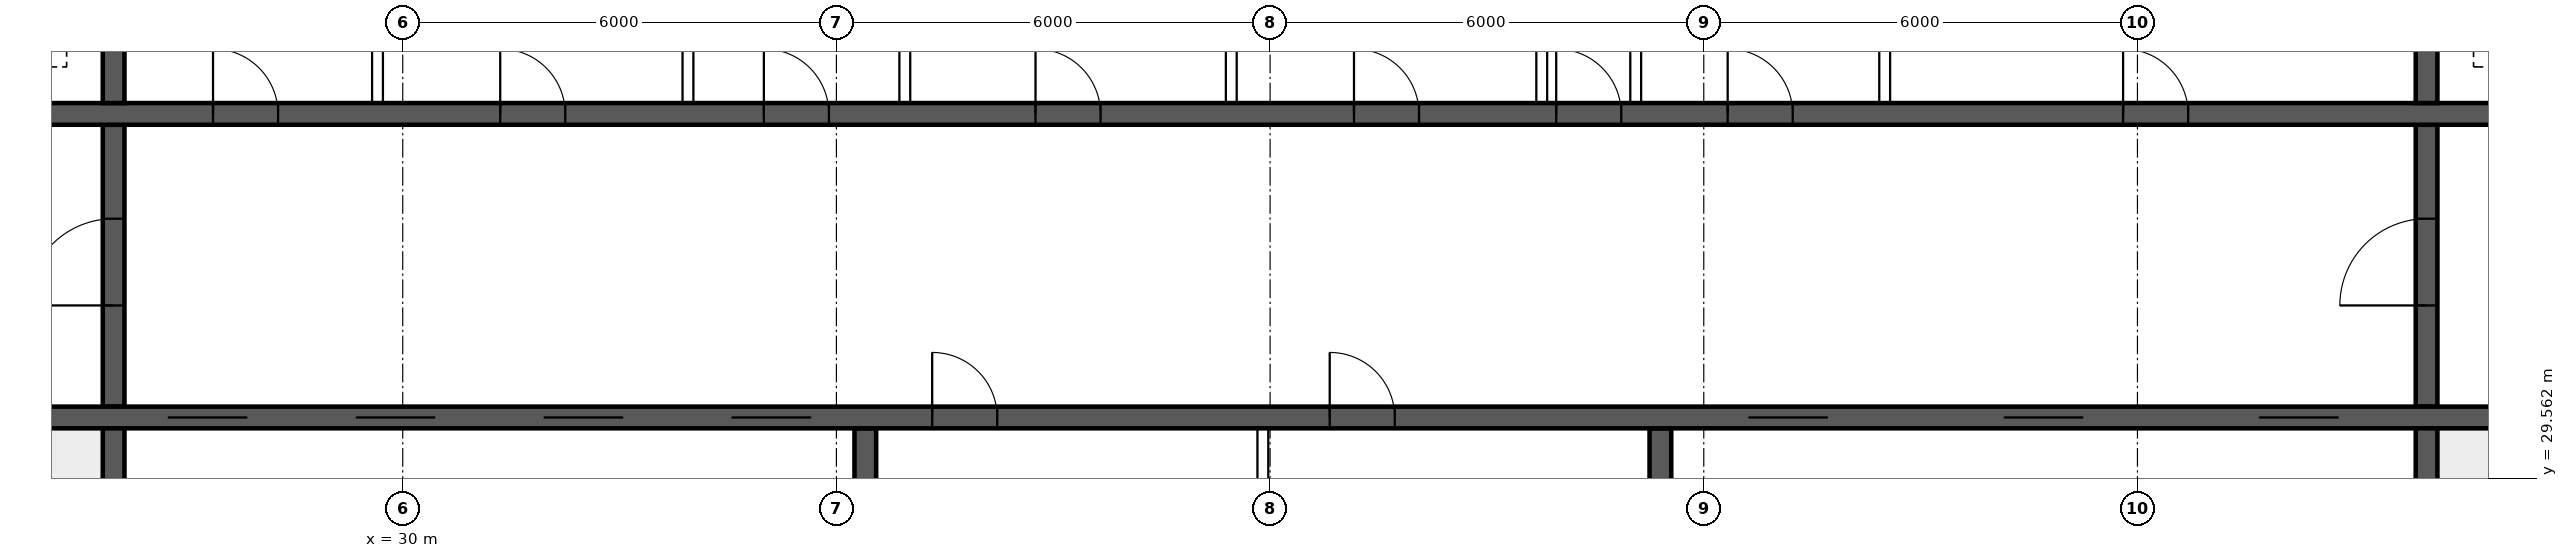
"""IFC4 building model, lengths in metres.
Left out: names, types, materials, properties, quantities, classifications, styles, units other than length and angle.
Written with IfcOpenShell. Run it as: python <this file> out.ifc"""

import sys

from ifc_helpers import new_model, si_unit, direction, frame, frame_2d, origin, place, context, subcontext, project, spatial, rectangle, extrude, element, fill, save


model = new_model("IFC4")
c1 = context("Model", 3, precision=1e-05, world=origin(), true_north=direction((0.0, 1.0)))
c2 = subcontext(c1, "Body", "Model", "MODEL_VIEW")
j1 = project(units=[si_unit("LENGTHUNIT", "METRE"), si_unit("PLANEANGLEUNIT", "RADIAN")], contexts=[c1])
p1 = place(None, origin())
s1 = spatial("IfcSite", under=j1, at=p1, CompositionType="ELEMENT")
p2 = place(p1, origin())
s2 = spatial("IfcBuilding", under=s1, at=p2, CompositionType="ELEMENT")
p3 = place(p2, frame((0.0, 0.0, 254.05)))
s3 = spatial("IfcBuildingStorey", under=s2, at=p3, CompositionType="ELEMENT", Elevation=254.05)
p4 = place(p3, frame((18.35, 30.4, 0.0), z_axis=(0.0, 0.0, 1.0), x_axis=(1.0, 0.0, 0.0)))
e1 = element("IfcWall", 1, at=p4, inside=s3, PredefinedType="SHEAR", context=c2, shape_type="SweptSolid", body=[
    extrude(rectangle(XDim=47.3, YDim=0.3, at=frame_2d((23.65, 0.0))), origin(), (0.0, 0.0, 1.0), 3.75),
])
p5 = place(p4, frame((0.4, 0.0, 0.0)))
e2 = element("IfcOpeningElement", 2, at=p5, cuts=e1, PredefinedType="OPENING", context=c2, shape_type="SweptSolid", body=[
    extrude(rectangle(XDim=1.0, YDim=2.1, at=frame_2d((0.5, 1.05))), frame((0.0, 0.16, 0.0), z_axis=(0.0, -1.0, 0.0), x_axis=(1.0, 0.0, 0.0)), (0.0, 0.0, 1.0), 0.32),
])
p6 = place(p4, frame((45.9, 0.0, 0.0)))
e3 = element("IfcOpeningElement", 3, at=p6, cuts=e1, PredefinedType="OPENING", context=c2, shape_type="SweptSolid", body=[
    extrude(rectangle(XDim=1.0, YDim=2.1, at=frame_2d((0.5, 1.05))), frame((0.0, 0.16, 0.0), z_axis=(0.0, -1.0, 0.0), x_axis=(1.0, 0.0, 0.0)), (0.0, 0.0, 1.0), 0.32),
])
p7 = place(p4, frame((8.4, 0.0, 0.0)))
e4 = element("IfcOpeningElement", 4, at=p7, cuts=e1, PredefinedType="OPENING", context=c2, shape_type="SweptSolid", body=[
    extrude(rectangle(XDim=1.1, YDim=2.1, at=frame_2d((0.55, 1.05))), frame((0.0, 0.16, 0.0), z_axis=(0.0, -1.0, 0.0), x_axis=(1.0, 0.0, 0.0)), (0.0, 0.0, 1.0), 0.32),
])
p8 = place(p4, frame((11.0, 0.0, 0.0)))
e5 = element("IfcOpeningElement", 5, at=p8, cuts=e1, PredefinedType="OPENING", context=c2, shape_type="SweptSolid", body=[
    extrude(rectangle(XDim=1.1, YDim=2.1, at=frame_2d((0.55, 1.05))), frame((0.0, 0.16, 0.0), z_axis=(0.0, -1.0, 0.0), x_axis=(1.0, 0.0, 0.0)), (0.0, 0.0, 1.0), 0.32),
])
p9 = place(p4, frame((13.6, 0.0, 0.0)))
e6 = element("IfcOpeningElement", 6, at=p9, cuts=e1, PredefinedType="OPENING", context=c2, shape_type="SweptSolid", body=[
    extrude(rectangle(XDim=1.1, YDim=2.1, at=frame_2d((0.55, 1.05))), frame((0.0, 0.16, 0.0), z_axis=(0.0, -1.0, 0.0), x_axis=(1.0, 0.0, 0.0)), (0.0, 0.0, 1.0), 0.32),
])
p10 = place(p4, frame((16.2, 0.0, 0.0)))
e7 = element("IfcOpeningElement", 7, at=p10, cuts=e1, PredefinedType="OPENING", context=c2, shape_type="SweptSolid", body=[
    extrude(rectangle(XDim=1.1, YDim=2.1, at=frame_2d((0.55, 1.05))), frame((0.0, 0.16, 0.0), z_axis=(0.0, -1.0, 0.0), x_axis=(1.0, 0.0, 0.0)), (0.0, 0.0, 1.0), 0.32),
])
p11 = place(p4, frame((18.975, 0.0, 0.0)))
e8 = element("IfcOpeningElement", 8, at=p11, cuts=e1, PredefinedType="OPENING", context=c2, shape_type="SweptSolid", body=[
    extrude(rectangle(XDim=0.9, YDim=2.1, at=frame_2d((0.45, 1.05))), frame((0.0, 0.16, 0.0), z_axis=(0.0, -1.0, 0.0), x_axis=(1.0, 0.0, 0.0)), (0.0, 0.0, 1.0), 0.32),
])
p12 = place(p4, frame((24.475, 0.0, 0.0)))
e9 = element("IfcOpeningElement", 9, at=p12, cuts=e1, PredefinedType="OPENING", context=c2, shape_type="SweptSolid", body=[
    extrude(rectangle(XDim=0.9, YDim=2.1, at=frame_2d((0.45, 1.05))), frame((0.0, 0.16, 0.0), z_axis=(0.0, -1.0, 0.0), x_axis=(1.0, 0.0, 0.0)), (0.0, 0.0, 1.0), 0.32),
])
p13 = place(p4, frame((30.267, 0.0, 0.0)))
e10 = element("IfcOpeningElement", 10, at=p13, cuts=e1, PredefinedType="OPENING", context=c2, shape_type="SweptSolid", body=[
    extrude(rectangle(XDim=1.1, YDim=2.1, at=frame_2d((0.55, 1.05))), frame((0.0, 0.16, 0.0), z_axis=(0.0, -1.0, 0.0), x_axis=(1.0, 0.0, 0.0)), (0.0, 0.0, 1.0), 0.32),
])
p14 = place(p4, frame((33.8, 0.0, 0.0)))
e11 = element("IfcOpeningElement", 11, at=p14, cuts=e1, PredefinedType="OPENING", context=c2, shape_type="SweptSolid", body=[
    extrude(rectangle(XDim=1.1, YDim=2.1, at=frame_2d((0.55, 1.05))), frame((0.0, 0.16, 0.0), z_axis=(0.0, -1.0, 0.0), x_axis=(1.0, 0.0, 0.0)), (0.0, 0.0, 1.0), 0.32),
])
p15 = place(p4, frame((37.333, 0.0, 0.0)))
e12 = element("IfcOpeningElement", 12, at=p15, cuts=e1, PredefinedType="OPENING", context=c2, shape_type="SweptSolid", body=[
    extrude(rectangle(XDim=1.1, YDim=2.1, at=frame_2d((0.55, 1.05))), frame((0.0, 0.16, 0.0), z_axis=(0.0, -1.0, 0.0), x_axis=(1.0, 0.0, 0.0)), (0.0, 0.0, 1.0), 0.32),
])
p16 = place(p3, frame((18.35, 34.6, 0.0), z_axis=(0.0, 0.0, 1.0), x_axis=(1.0, 0.0, 0.0)))
e13 = element("IfcWall", 13, at=p16, inside=s3, PredefinedType="SHEAR", context=c2, shape_type="SweptSolid", body=[
    extrude(rectangle(XDim=47.3, YDim=0.3, at=frame_2d((23.65, 0.0))), origin(), (0.0, 0.0, 1.0), 3.75),
])
p17 = place(p16, frame((0.9, 0.0, 0.0)))
e14 = element("IfcOpeningElement", 14, at=p17, cuts=e13, PredefinedType="OPENING", context=c2, shape_type="SweptSolid", body=[
    extrude(rectangle(XDim=1.1, YDim=2.1, at=frame_2d((0.55, 1.05))), frame((0.0, 0.16, 0.0), z_axis=(0.0, -1.0, 0.0), x_axis=(1.0, 0.0, 0.0)), (0.0, 0.0, 1.0), 0.32),
])
p18 = place(p16, frame((45.3, 0.0, 0.0)))
e15 = element("IfcOpeningElement", 15, at=p18, cuts=e13, PredefinedType="OPENING", context=c2, shape_type="SweptSolid", body=[
    extrude(rectangle(XDim=1.1, YDim=2.1, at=frame_2d((0.55, 1.05))), frame((0.0, 0.16, 0.0), z_axis=(0.0, -1.0, 0.0), x_axis=(1.0, 0.0, 0.0)), (0.0, 0.0, 1.0), 0.32),
])
p19 = place(p16, frame((4.25, 0.0, 0.0)))
e16 = element("IfcOpeningElement", 16, at=p19, cuts=e13, PredefinedType="OPENING", context=c2, shape_type="SweptSolid", body=[
    extrude(rectangle(XDim=0.9, YDim=2.1, at=frame_2d((0.45, 1.05))), frame((0.0, 0.16, 0.0), z_axis=(0.0, -1.0, 0.0), x_axis=(1.0, 0.0, 0.0)), (0.0, 0.0, 1.0), 0.32),
])
p20 = place(p16, frame((42.15, 0.0, 0.0)))
e17 = element("IfcOpeningElement", 17, at=p20, cuts=e13, PredefinedType="OPENING", context=c2, shape_type="SweptSolid", body=[
    extrude(rectangle(XDim=0.9, YDim=2.1, at=frame_2d((0.45, 1.05))), frame((0.0, 0.16, 0.0), z_axis=(0.0, -1.0, 0.0), x_axis=(1.0, 0.0, 0.0)), (0.0, 0.0, 1.0), 0.32),
])
p21 = place(p16, frame((9.025, 0.0, 0.0)))
e18 = element("IfcOpeningElement", 18, at=p21, cuts=e13, PredefinedType="OPENING", context=c2, shape_type="SweptSolid", body=[
    extrude(rectangle(XDim=0.9, YDim=2.1, at=frame_2d((0.45, 1.05))), frame((0.0, 0.16, 0.0), z_axis=(0.0, -1.0, 0.0), x_axis=(1.0, 0.0, 0.0)), (0.0, 0.0, 1.0), 0.32),
])
p22 = place(p16, frame((12.999, 0.0, 0.0)))
e19 = element("IfcOpeningElement", 19, at=p22, cuts=e13, PredefinedType="OPENING", context=c2, shape_type="SweptSolid", body=[
    extrude(rectangle(XDim=0.9, YDim=2.1, at=frame_2d((0.45, 1.05))), frame((0.0, 0.16, 0.0), z_axis=(0.0, -1.0, 0.0), x_axis=(1.0, 0.0, 0.0)), (0.0, 0.0, 1.0), 0.32),
])
p23 = place(p16, frame((16.646, 0.0, 0.0)))
e20 = element("IfcOpeningElement", 20, at=p23, cuts=e13, PredefinedType="OPENING", context=c2, shape_type="SweptSolid", body=[
    extrude(rectangle(XDim=0.9, YDim=2.1, at=frame_2d((0.45, 1.05))), frame((0.0, 0.16, 0.0), z_axis=(0.0, -1.0, 0.0), x_axis=(1.0, 0.0, 0.0)), (0.0, 0.0, 1.0), 0.32),
])
p24 = place(p16, frame((20.405, 0.0, 0.0)))
e21 = element("IfcOpeningElement", 21, at=p24, cuts=e13, PredefinedType="OPENING", context=c2, shape_type="SweptSolid", body=[
    extrude(rectangle(XDim=0.9, YDim=2.1, at=frame_2d((0.45, 1.05))), frame((0.0, 0.16, 0.0), z_axis=(0.0, -1.0, 0.0), x_axis=(1.0, 0.0, 0.0)), (0.0, 0.0, 1.0), 0.32),
])
p25 = place(p16, frame((24.811, 0.0, 0.0)))
e22 = element("IfcOpeningElement", 22, at=p25, cuts=e13, PredefinedType="OPENING", context=c2, shape_type="SweptSolid", body=[
    extrude(rectangle(XDim=0.9, YDim=2.1, at=frame_2d((0.45, 1.05))), frame((0.0, 0.16, 0.0), z_axis=(0.0, -1.0, 0.0), x_axis=(1.0, 0.0, 0.0)), (0.0, 0.0, 1.0), 0.32),
])
p26 = place(p16, frame((27.608, 0.0, 0.0)))
e23 = element("IfcOpeningElement", 23, at=p26, cuts=e13, PredefinedType="OPENING", context=c2, shape_type="SweptSolid", body=[
    extrude(rectangle(XDim=0.9, YDim=2.1, at=frame_2d((0.45, 1.05))), frame((0.0, 0.16, 0.0), z_axis=(0.0, -1.0, 0.0), x_axis=(1.0, 0.0, 0.0)), (0.0, 0.0, 1.0), 0.32),
])
p27 = place(p16, frame((29.981, 0.0, 0.0)))
e24 = element("IfcOpeningElement", 24, at=p27, cuts=e13, PredefinedType="OPENING", context=c2, shape_type="SweptSolid", body=[
    extrude(rectangle(XDim=0.9, YDim=2.1, at=frame_2d((0.45, 1.05))), frame((0.0, 0.16, 0.0), z_axis=(0.0, -1.0, 0.0), x_axis=(1.0, 0.0, 0.0)), (0.0, 0.0, 1.0), 0.32),
])
p28 = place(p16, frame((35.451, 0.0, 0.0)))
e25 = element("IfcOpeningElement", 25, at=p28, cuts=e13, PredefinedType="OPENING", context=c2, shape_type="SweptSolid", body=[
    extrude(rectangle(XDim=0.9, YDim=2.1, at=frame_2d((0.45, 1.05))), frame((0.0, 0.16, 0.0), z_axis=(0.0, -1.0, 0.0), x_axis=(1.0, 0.0, 0.0)), (0.0, 0.0, 1.0), 0.32),
])
for number, where, z_axis, x_axis in (
    (26, (26.0, 26.15, 0.0), (0.0, 0.0, 1.0), (0.0, 1.0, 0.0)),
    (27, (58.0, 26.15, 0.0), (0.0, 0.0, 1.0), (0.0, 1.0, 0.0)),
):
    element("IfcWall", number, at=place(p3, frame(where, z_axis=z_axis, x_axis=x_axis)), inside=s3, PredefinedType="SHEAR", context=c2, shape_type="SweptSolid", body=[
        extrude(rectangle(XDim=4.1, YDim=0.3, at=frame_2d((2.05, 0.0))), origin(), (0.0, 0.0, 1.0), 3.75),
    ])
p29 = place(p3, frame((26.0, 30.55, 0.0), z_axis=(0.0, 0.0, 1.0), x_axis=(0.0, 1.0, 0.0)))
e28 = element("IfcWall", 28, at=p29, inside=s3, PredefinedType="SHEAR", context=c2, shape_type="SweptSolid", body=[
    extrude(rectangle(XDim=3.9, YDim=0.3, at=frame_2d((1.95, 0.0))), origin(), (0.0, 0.0, 1.0), 3.75),
])
p30 = place(p29, frame((1.4, 0.0, 0.0)))
e29 = element("IfcOpeningElement", 29, at=p30, cuts=e28, PredefinedType="OPENING", context=c2, shape_type="SweptSolid", body=[
    extrude(rectangle(XDim=1.2, YDim=2.1, at=frame_2d((0.6, 1.05))), frame((0.0, 0.16, 0.0), z_axis=(0.0, -1.0, 0.0), x_axis=(1.0, 0.0, 0.0)), (0.0, 0.0, 1.0), 0.32),
])
p31 = place(p3, frame((58.0, 30.55, 0.0), z_axis=(0.0, 0.0, 1.0), x_axis=(0.0, 1.0, 0.0)))
e30 = element("IfcWall", 30, at=p31, inside=s3, PredefinedType="SHEAR", context=c2, shape_type="SweptSolid", body=[
    extrude(rectangle(XDim=3.9, YDim=0.3, at=frame_2d((1.95, 0.0))), origin(), (0.0, 0.0, 1.0), 3.75),
])
p32 = place(p31, frame((1.4, 0.0, 0.0)))
e31 = element("IfcOpeningElement", 31, at=p32, cuts=e30, PredefinedType="OPENING", context=c2, shape_type="SweptSolid", body=[
    extrude(rectangle(XDim=1.2, YDim=2.1, at=frame_2d((0.6, 1.05))), frame((0.0, 0.16, 0.0), z_axis=(0.0, -1.0, 0.0), x_axis=(1.0, 0.0, 0.0)), (0.0, 0.0, 1.0), 0.32),
])
for number, where, z_axis, x_axis in (
    (32, (26.0, 34.75, 0.0), (0.0, 0.0, 1.0), (0.0, 1.0, 0.0)),
    (33, (58.0, 34.75, 0.0), (0.0, 0.0, 1.0), (0.0, 1.0, 0.0)),
):
    element("IfcWall", number, at=place(p3, frame(where, z_axis=z_axis, x_axis=x_axis)), inside=s3, PredefinedType="SHEAR", context=c2, shape_type="SweptSolid", body=[
        extrude(rectangle(XDim=3.1, YDim=0.3, at=frame_2d((1.55, 0.0))), origin(), (0.0, 0.0, 1.0), 3.75),
    ])
for number, where, z_axis, x_axis in (
    (34, (36.4, 26.15, 0.0), (0.0, 0.0, 1.0), (0.0, 1.0, 0.0)),
    (35, (47.4, 26.15, 0.0), (0.0, 0.0, 1.0), (0.0, 1.0, 0.0)),
):
    element("IfcWall", number, at=place(p3, frame(where, z_axis=z_axis, x_axis=x_axis)), inside=s3, PredefinedType="SHEAR", context=c2, shape_type="SweptSolid", body=[
        extrude(rectangle(XDim=4.1, YDim=0.3, at=frame_2d((2.05, 0.0))), origin(), (0.0, 0.0, 1.0), 3.75),
    ])
for number, where, z_axis, x_axis in (
    (36, (29.651, 34.75, 0.0), (0.0, 0.0, 1.0), (0.0, 1.0, 0.0)),
    (37, (33.946, 34.75, 0.0), (0.0, 0.0, 1.0), (0.0, 1.0, 0.0)),
    (38, (36.946, 34.75, 0.0), (0.0, 0.0, 1.0), (0.0, 1.0, 0.0)),
    (39, (41.463, 34.75, 0.0), (0.0, 0.0, 1.0), (0.0, 1.0, 0.0)),
    (40, (45.758, 34.75, 0.0), (0.0, 0.0, 1.0), (0.0, 1.0, 0.0)),
    (41, (47.058, 34.75, 0.0), (0.0, 0.0, 1.0), (0.0, 1.0, 0.0)),
    (42, (50.503, 34.75, 0.0), (0.0, 0.0, 1.0), (0.0, 1.0, 0.0)),
):
    element("IfcWall", number, at=place(p3, frame(where, z_axis=z_axis, x_axis=x_axis)), inside=s3, PredefinedType="SOLIDWALL", context=c2, shape_type="SweptSolid", body=[
        extrude(rectangle(XDim=3.1, YDim=0.15, at=frame_2d((1.55, 0.0))), origin(), (0.0, 0.0, 1.0), 3.45),
    ])
p33 = place(p3, frame((41.9, 26.15, 0.0), z_axis=(0.0, 0.0, 1.0), x_axis=(0.0, 1.0, 0.0)))
e43 = element("IfcWall", 43, at=p33, inside=s3, PredefinedType="SOLIDWALL", context=c2, shape_type="SweptSolid", body=[
    extrude(rectangle(XDim=4.1, YDim=0.15, at=frame_2d((2.05, 0.0))), origin(), (0.0, 0.0, 1.0), 3.45),
])
p34 = place(p30, origin())
e44 = element("IfcDoor", 44, at=p34, inside=s3, OperationType="SINGLE_SWING_LEFT", PredefinedType="DOOR", context=c2, shape_type="SweptSolid", body=[
    extrude(rectangle(XDim=1.2, YDim=2.1, at=frame_2d((0.6, 1.05))), frame((0.0, 0.025, 0.0), z_axis=(0.0, -1.0, 0.0), x_axis=(1.0, 0.0, 0.0)), (0.0, 0.0, 1.0), 0.05),
])
fill(e29, e44)
p35 = place(p32, origin())
e45 = element("IfcDoor", 45, at=p35, inside=s3, OperationType="SINGLE_SWING_LEFT", PredefinedType="DOOR", context=c2, shape_type="SweptSolid", body=[
    extrude(rectangle(XDim=1.2, YDim=2.1, at=frame_2d((0.6, 1.05))), frame((0.0, 0.025, 0.0), z_axis=(0.0, -1.0, 0.0), x_axis=(1.0, 0.0, 0.0)), (0.0, 0.0, 1.0), 0.05),
])
fill(e31, e45)
p36 = place(p21, origin())
e46 = element("IfcDoor", 46, at=p36, inside=s3, OperationType="SINGLE_SWING_LEFT", PredefinedType="DOOR", context=c2, shape_type="SweptSolid", body=[
    extrude(rectangle(XDim=0.9, YDim=2.1, at=frame_2d((0.45, 1.05))), frame((0.0, 0.025, 0.0), z_axis=(0.0, -1.0, 0.0), x_axis=(1.0, 0.0, 0.0)), (0.0, 0.0, 1.0), 0.05),
])
fill(e18, e46)
p37 = place(p22, origin())
e47 = element("IfcDoor", 47, at=p37, inside=s3, OperationType="SINGLE_SWING_LEFT", PredefinedType="DOOR", context=c2, shape_type="SweptSolid", body=[
    extrude(rectangle(XDim=0.9, YDim=2.1, at=frame_2d((0.45, 1.05))), frame((0.0, 0.025, 0.0), z_axis=(0.0, -1.0, 0.0), x_axis=(1.0, 0.0, 0.0)), (0.0, 0.0, 1.0), 0.05),
])
fill(e19, e47)
p38 = place(p23, origin())
e48 = element("IfcDoor", 48, at=p38, inside=s3, OperationType="SINGLE_SWING_LEFT", PredefinedType="DOOR", context=c2, shape_type="SweptSolid", body=[
    extrude(rectangle(XDim=0.9, YDim=2.1, at=frame_2d((0.45, 1.05))), frame((0.0, 0.025, 0.0), z_axis=(0.0, -1.0, 0.0), x_axis=(1.0, 0.0, 0.0)), (0.0, 0.0, 1.0), 0.05),
])
fill(e20, e48)
p39 = place(p24, origin())
e49 = element("IfcDoor", 49, at=p39, inside=s3, OperationType="SINGLE_SWING_LEFT", PredefinedType="DOOR", context=c2, shape_type="SweptSolid", body=[
    extrude(rectangle(XDim=0.9, YDim=2.1, at=frame_2d((0.45, 1.05))), frame((0.0, 0.025, 0.0), z_axis=(0.0, -1.0, 0.0), x_axis=(1.0, 0.0, 0.0)), (0.0, 0.0, 1.0), 0.05),
])
fill(e21, e49)
p40 = place(p25, origin())
e50 = element("IfcDoor", 50, at=p40, inside=s3, OperationType="SINGLE_SWING_LEFT", PredefinedType="DOOR", context=c2, shape_type="SweptSolid", body=[
    extrude(rectangle(XDim=0.9, YDim=2.1, at=frame_2d((0.45, 1.05))), frame((0.0, 0.025, 0.0), z_axis=(0.0, -1.0, 0.0), x_axis=(1.0, 0.0, 0.0)), (0.0, 0.0, 1.0), 0.05),
])
fill(e22, e50)
p41 = place(p26, origin())
e51 = element("IfcDoor", 51, at=p41, inside=s3, OperationType="SINGLE_SWING_LEFT", PredefinedType="DOOR", context=c2, shape_type="SweptSolid", body=[
    extrude(rectangle(XDim=0.9, YDim=2.1, at=frame_2d((0.45, 1.05))), frame((0.0, 0.025, 0.0), z_axis=(0.0, -1.0, 0.0), x_axis=(1.0, 0.0, 0.0)), (0.0, 0.0, 1.0), 0.05),
])
fill(e23, e51)
p42 = place(p27, origin())
e52 = element("IfcDoor", 52, at=p42, inside=s3, OperationType="SINGLE_SWING_LEFT", PredefinedType="DOOR", context=c2, shape_type="SweptSolid", body=[
    extrude(rectangle(XDim=0.9, YDim=2.1, at=frame_2d((0.45, 1.05))), frame((0.0, 0.025, 0.0), z_axis=(0.0, -1.0, 0.0), x_axis=(1.0, 0.0, 0.0)), (0.0, 0.0, 1.0), 0.05),
])
fill(e24, e52)
p43 = place(p28, origin())
e53 = element("IfcDoor", 53, at=p43, inside=s3, OperationType="SINGLE_SWING_LEFT", PredefinedType="DOOR", context=c2, shape_type="SweptSolid", body=[
    extrude(rectangle(XDim=0.9, YDim=2.1, at=frame_2d((0.45, 1.05))), frame((0.0, 0.025, 0.0), z_axis=(0.0, -1.0, 0.0), x_axis=(1.0, 0.0, 0.0)), (0.0, 0.0, 1.0), 0.05),
])
fill(e25, e53)
p44 = place(p7, origin())
e54 = element("IfcDoor", 54, at=p44, inside=s3, OperationType="DOUBLE_DOOR_SLIDING", PredefinedType="DOOR", context=c2, shape_type="SweptSolid", body=[
    extrude(rectangle(XDim=1.1, YDim=2.1, at=frame_2d((0.55, 1.05))), frame((0.0, 0.025, 0.0), z_axis=(0.0, -1.0, 0.0), x_axis=(1.0, 0.0, 0.0)), (0.0, 0.0, 1.0), 0.05),
])
fill(e4, e54)
p45 = place(p8, origin())
e55 = element("IfcDoor", 55, at=p45, inside=s3, OperationType="DOUBLE_DOOR_SLIDING", PredefinedType="DOOR", context=c2, shape_type="SweptSolid", body=[
    extrude(rectangle(XDim=1.1, YDim=2.1, at=frame_2d((0.55, 1.05))), frame((0.0, 0.025, 0.0), z_axis=(0.0, -1.0, 0.0), x_axis=(1.0, 0.0, 0.0)), (0.0, 0.0, 1.0), 0.05),
])
fill(e5, e55)
p46 = place(p9, origin())
e56 = element("IfcDoor", 56, at=p46, inside=s3, OperationType="DOUBLE_DOOR_SLIDING", PredefinedType="DOOR", context=c2, shape_type="SweptSolid", body=[
    extrude(rectangle(XDim=1.1, YDim=2.1, at=frame_2d((0.55, 1.05))), frame((0.0, 0.025, 0.0), z_axis=(0.0, -1.0, 0.0), x_axis=(1.0, 0.0, 0.0)), (0.0, 0.0, 1.0), 0.05),
])
fill(e6, e56)
p47 = place(p10, origin())
e57 = element("IfcDoor", 57, at=p47, inside=s3, OperationType="DOUBLE_DOOR_SLIDING", PredefinedType="DOOR", context=c2, shape_type="SweptSolid", body=[
    extrude(rectangle(XDim=1.1, YDim=2.1, at=frame_2d((0.55, 1.05))), frame((0.0, 0.025, 0.0), z_axis=(0.0, -1.0, 0.0), x_axis=(1.0, 0.0, 0.0)), (0.0, 0.0, 1.0), 0.05),
])
fill(e7, e57)
p48 = place(p11, origin())
e58 = element("IfcDoor", 58, at=p48, inside=s3, OperationType="SINGLE_SWING_LEFT", PredefinedType="DOOR", context=c2, shape_type="SweptSolid", body=[
    extrude(rectangle(XDim=0.9, YDim=2.1, at=frame_2d((0.45, 1.05))), frame((0.0, 0.025, 0.0), z_axis=(0.0, -1.0, 0.0), x_axis=(1.0, 0.0, 0.0)), (0.0, 0.0, 1.0), 0.05),
])
fill(e8, e58)
p49 = place(p12, origin())
e59 = element("IfcDoor", 59, at=p49, inside=s3, OperationType="SINGLE_SWING_LEFT", PredefinedType="DOOR", context=c2, shape_type="SweptSolid", body=[
    extrude(rectangle(XDim=0.9, YDim=2.1, at=frame_2d((0.45, 1.05))), frame((0.0, 0.025, 0.0), z_axis=(0.0, -1.0, 0.0), x_axis=(1.0, 0.0, 0.0)), (0.0, 0.0, 1.0), 0.05),
])
fill(e9, e59)
p50 = place(p13, origin())
e60 = element("IfcDoor", 60, at=p50, inside=s3, OperationType="DOUBLE_DOOR_SLIDING", PredefinedType="DOOR", context=c2, shape_type="SweptSolid", body=[
    extrude(rectangle(XDim=1.1, YDim=2.1, at=frame_2d((0.55, 1.05))), frame((0.0, 0.025, 0.0), z_axis=(0.0, -1.0, 0.0), x_axis=(1.0, 0.0, 0.0)), (0.0, 0.0, 1.0), 0.05),
])
fill(e10, e60)
p51 = place(p14, origin())
e61 = element("IfcDoor", 61, at=p51, inside=s3, OperationType="DOUBLE_DOOR_SLIDING", PredefinedType="DOOR", context=c2, shape_type="SweptSolid", body=[
    extrude(rectangle(XDim=1.1, YDim=2.1, at=frame_2d((0.55, 1.05))), frame((0.0, 0.025, 0.0), z_axis=(0.0, -1.0, 0.0), x_axis=(1.0, 0.0, 0.0)), (0.0, 0.0, 1.0), 0.05),
])
fill(e11, e61)
p52 = place(p15, origin())
e62 = element("IfcDoor", 62, at=p52, inside=s3, OperationType="DOUBLE_DOOR_SLIDING", PredefinedType="DOOR", context=c2, shape_type="SweptSolid", body=[
    extrude(rectangle(XDim=1.1, YDim=2.1, at=frame_2d((0.55, 1.05))), frame((0.0, 0.025, 0.0), z_axis=(0.0, -1.0, 0.0), x_axis=(1.0, 0.0, 0.0)), (0.0, 0.0, 1.0), 0.05),
])
fill(e12, e62)
save(model, sys.argv[1])
